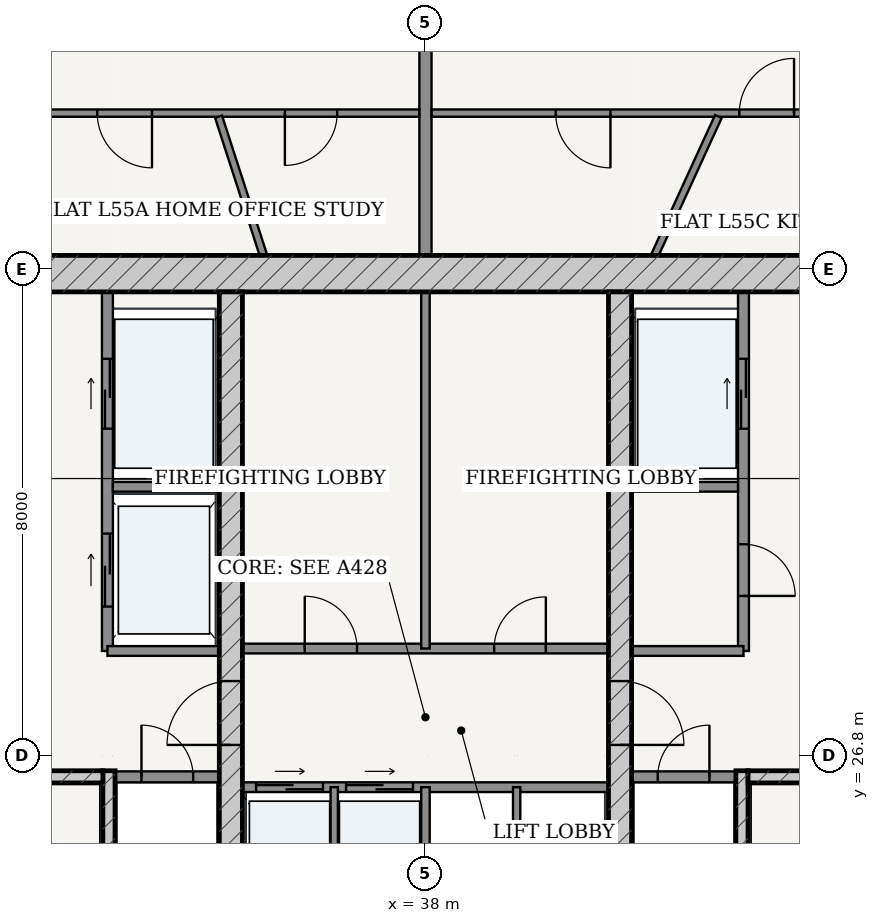
"""IFC4 building model, lengths in metres.
Left out: names, types, materials, properties, quantities, classifications, styles, units other than length and angle.
Written with IfcOpenShell. Run it as: python <this file> out.ifc"""

import sys

from ifc_helpers import new_model, si_unit, direction, frame, frame_2d, origin, place, context, subcontext, project, spatial, rectangle, extrude, source, transform, mapped, element, fill, save


model = new_model("IFC4")
c1 = context("Model", 3, precision=1e-05, world=origin(), true_north=direction((-0.2419218956, 0.970295726276)))
c2 = subcontext(c1, "Body", "Model", "MODEL_VIEW")
j1 = project(units=[si_unit("LENGTHUNIT", "METRE"), si_unit("PLANEANGLEUNIT", "RADIAN")], contexts=[c1])
p1 = place(None, origin())
s1 = spatial("IfcSite", under=j1, at=p1, CompositionType="ELEMENT")
p2 = place(p1, origin())
s2 = spatial("IfcBuilding", under=s1, at=p2, CompositionType="ELEMENT")
p3 = place(p2, frame((0.0, 0.0, 209.7)))
s3 = spatial("IfcBuildingStorey", under=s2, at=p3, CompositionType="ELEMENT", Elevation=209.7)
p4 = place(p3, frame((28.775, 34.725, 0.0), z_axis=(0.0, 0.0, 1.0), x_axis=(1.0, 0.0, 0.0)))
e1 = element("IfcWall", 1, at=p4, inside=s3, PredefinedType="SHEAR", context=c2, shape_type="SweptSolid", body=[
    extrude(rectangle(XDim=18.45, YDim=0.6, at=frame_2d((9.225, 0.0))), origin(), (0.0, 0.0, 1.0), 3.435),
])
p5 = place(p3, frame((32.795, 19.175, 0.0), z_axis=(0.0, 0.0, 1.0), x_axis=(0.0, 1.0, 0.0)))
e2 = element("IfcWall", 2, at=p5, inside=s3, PredefinedType="SOLIDWALL", context=c2, shape_type="SweptSolid", body=[
    extrude(rectangle(XDim=7.375, YDim=0.2, at=frame_2d((3.688, 0.0))), origin(), (0.0, 0.0, 1.0), 3.435),
])
p6 = place(p3, frame((29.375, 26.45, 0.0), z_axis=(0.0, 0.0, 1.0), x_axis=(1.0, 0.0, 0.0)))
e3 = element("IfcWall", 3, at=p6, inside=s3, PredefinedType="SOLIDWALL", context=c2, shape_type="SweptSolid", body=[
    extrude(rectangle(XDim=3.32, YDim=0.2, at=frame_2d((1.66, 0.0))), origin(), (0.0, 0.0, 1.0), 3.435),
])
p7 = place(p6, frame((1.185, 0.0, 0.0)))
e4 = element("IfcOpeningElement", 4, at=p7, cuts=e3, PredefinedType="OPENING", context=c2, shape_type="SweptSolid", body=[
    extrude(rectangle(XDim=0.95, YDim=2.15, at=frame_2d((0.475, 1.075))), frame((0.0, 0.11, 0.0), z_axis=(0.0, -1.0, 0.0), x_axis=(1.0, 0.0, 0.0)), (0.0, 0.0, 1.0), 0.22),
])
p8 = place(p3, frame((43.205, 19.175, 0.0), z_axis=(0.0, 0.0, 1.0), x_axis=(0.0, 1.0, 0.0)))
e5 = element("IfcWall", 5, at=p8, inside=s3, PredefinedType="SOLIDWALL", context=c2, shape_type="SweptSolid", body=[
    extrude(rectangle(XDim=7.375, YDim=0.2, at=frame_2d((3.688, 0.0))), origin(), (0.0, 0.0, 1.0), 3.435),
])
p9 = place(p3, frame((43.305, 26.45, 0.0), z_axis=(0.0, 0.0, 1.0), x_axis=(1.0, 0.0, 0.0)))
e6 = element("IfcWall", 6, at=p9, inside=s3, PredefinedType="SOLIDWALL", context=c2, shape_type="SweptSolid", body=[
    extrude(rectangle(XDim=3.32, YDim=0.2, at=frame_2d((1.66, 0.0))), origin(), (0.0, 0.0, 1.0), 3.435),
])
p10 = place(p9, frame((1.185, 0.0, 0.0)))
e7 = element("IfcOpeningElement", 7, at=p10, cuts=e6, PredefinedType="OPENING", context=c2, shape_type="SweptSolid", body=[
    extrude(rectangle(XDim=0.95, YDim=2.15, at=frame_2d((0.475, 1.075))), frame((0.0, 0.11, 0.0), z_axis=(0.0, -1.0, 0.0), x_axis=(1.0, 0.0, 0.0)), (0.0, 0.0, 1.0), 0.22),
])
p11 = place(p3, frame((34.8, 19.175, 0.0), z_axis=(0.0, 0.0, 1.0), x_axis=(0.0, 1.0, 0.0)))
e8 = element("IfcWall", 8, at=p11, inside=s3, PredefinedType="SHEAR", context=c2, shape_type="SweptSolid", body=[
    extrude(rectangle(XDim=15.25, YDim=0.38, at=frame_2d((7.625, 0.0))), origin(), (0.0, 0.0, 1.0), 3.435),
])
p12 = place(p11, frame((7.8, 0.0, 0.0)))
e9 = element("IfcOpeningElement", 9, at=p12, cuts=e8, PredefinedType="OPENING", context=c2, shape_type="SweptSolid", body=[
    extrude(rectangle(XDim=1.05, YDim=2.15, at=frame_2d((0.525, 1.075))), frame((0.0, 0.2, 0.0), z_axis=(0.0, -1.0, 0.0), x_axis=(1.0, 0.0, 0.0)), (0.0, 0.0, 1.0), 0.4),
])
p13 = place(p3, frame((41.2, 19.175, 0.0), z_axis=(0.0, 0.0, 1.0), x_axis=(0.0, 1.0, 0.0)))
e10 = element("IfcWall", 10, at=p13, inside=s3, PredefinedType="SHEAR", context=c2, shape_type="SweptSolid", body=[
    extrude(rectangle(XDim=15.25, YDim=0.38, at=frame_2d((7.625, 0.0))), origin(), (0.0, 0.0, 1.0), 3.435),
])
p14 = place(p13, frame((7.8, 0.0, 0.0)))
e11 = element("IfcOpeningElement", 11, at=p14, cuts=e10, PredefinedType="OPENING", context=c2, shape_type="SweptSolid", body=[
    extrude(rectangle(XDim=1.05, YDim=2.15, at=frame_2d((0.525, 1.075))), frame((0.0, 0.2, 0.0), z_axis=(0.0, -1.0, 0.0), x_axis=(1.0, 0.0, 0.0)), (0.0, 0.0, 1.0), 0.4),
])
p15 = place(p3, frame((32.9, 26.45, 0.0), z_axis=(0.0, 0.0, 1.0), x_axis=(1.0, 0.0, 0.0)))
e12 = element("IfcWall", 12, at=p15, inside=s3, PredefinedType="PARTITIONING", context=c2, shape_type="SweptSolid", body=[
    extrude(rectangle(XDim=1.71, YDim=0.18, at=frame_2d((0.855, 0.0))), origin(), (0.0, 0.0, 1.0), 3.435),
])
p16 = place(p15, frame((0.43, 0.0, 0.0)))
e13 = element("IfcOpeningElement", 13, at=p16, cuts=e12, PredefinedType="OPENING", context=c2, shape_type="SweptSolid", body=[
    extrude(rectangle(XDim=0.85, YDim=2.1, at=frame_2d((0.425, 1.05))), frame((0.0, 0.1, 0.0), z_axis=(0.0, -1.0, 0.0), x_axis=(1.0, 0.0, 0.0)), (0.0, 0.0, 1.0), 0.2),
])
p17 = place(p3, frame((41.39, 26.45, 0.0), z_axis=(0.0, 0.0, 1.0), x_axis=(1.0, 0.0, 0.0)))
e14 = element("IfcWall", 14, at=p17, inside=s3, PredefinedType="PARTITIONING", context=c2, shape_type="SweptSolid", body=[
    extrude(rectangle(XDim=1.71, YDim=0.18, at=frame_2d((0.855, 0.0))), origin(), (0.0, 0.0, 1.0), 3.435),
])
p18 = place(p17, frame((0.43, 0.0, 0.0)))
e15 = element("IfcOpeningElement", 15, at=p18, cuts=e14, PredefinedType="OPENING", context=c2, shape_type="SweptSolid", body=[
    extrude(rectangle(XDim=0.85, YDim=2.1, at=frame_2d((0.425, 1.05))), frame((0.0, 0.1, 0.0), z_axis=(0.0, -1.0, 0.0), x_axis=(1.0, 0.0, 0.0)), (0.0, 0.0, 1.0), 0.2),
])
p19 = place(p3, frame((32.77, 28.52, 0.0), z_axis=(0.0, 0.0, 1.0), x_axis=(0.0, 1.0, 0.0)))
e16 = element("IfcWall", 16, at=p19, inside=s3, PredefinedType="PARTITIONING", context=c2, shape_type="SweptSolid", body=[
    extrude(rectangle(XDim=5.905, YDim=0.18, at=frame_2d((2.953, 0.0))), origin(), (0.0, 0.0, 1.0), 3.435),
])
p20 = place(p19, frame((3.655, 0.0, 0.0)))
e17 = element("IfcOpeningElement", 17, at=p20, cuts=e16, PredefinedType="OPENING", context=c2, shape_type="SweptSolid", body=[
    extrude(rectangle(XDim=1.15, YDim=2.2, at=frame_2d((0.575, 1.1))), frame((0.0, 0.1, 0.0), z_axis=(0.0, -1.0, 0.0), x_axis=(1.0, 0.0, 0.0)), (0.0, 0.0, 1.0), 0.2),
])
p21 = place(p19, frame((0.73, 0.0, 0.0)))
e18 = element("IfcOpeningElement", 18, at=p21, cuts=e16, PredefinedType="OPENING", context=c2, shape_type="SweptSolid", body=[
    extrude(rectangle(XDim=1.2, YDim=2.25, at=frame_2d((0.6, 1.125))), frame((0.0, 0.1, 0.0), z_axis=(0.0, -1.0, 0.0), x_axis=(1.0, 0.0, 0.0)), (0.0, 0.0, 1.0), 0.2),
])
p22 = place(p3, frame((32.86, 31.22, 0.0), z_axis=(0.0, 0.0, 1.0), x_axis=(1.0, 0.0, 0.0)))
e19 = element("IfcWall", 19, at=p22, inside=s3, PredefinedType="PARTITIONING", context=c2, shape_type="SweptSolid", body=[
    extrude(rectangle(XDim=1.75, YDim=0.16, at=frame_2d((0.875, 0.0))), origin(), (0.0, 0.0, 1.0), 3.435),
])
p23 = place(p3, frame((32.77, 28.52, 0.0), z_axis=(0.0, 0.0, 1.0), x_axis=(1.0, 0.0, 0.0)))
e20 = element("IfcWall", 20, at=p23, inside=s3, PredefinedType="PARTITIONING", context=c2, shape_type="SweptSolid", body=[
    extrude(rectangle(XDim=1.84, YDim=0.16, at=frame_2d((0.92, 0.0))), origin(), (0.0, 0.0, 1.0), 3.435),
])
p24 = place(p3, frame((43.23, 28.52, 0.0), z_axis=(0.0, 0.0, 1.0), x_axis=(0.0, 1.0, 0.0)))
e21 = element("IfcWall", 21, at=p24, inside=s3, PredefinedType="PARTITIONING", context=c2, shape_type="SweptSolid", body=[
    extrude(rectangle(XDim=5.905, YDim=0.18, at=frame_2d((2.953, 0.0))), origin(), (0.0, 0.0, 1.0), 3.435),
])
p25 = place(p24, frame((0.905, 0.0, 0.0)))
e22 = element("IfcOpeningElement", 22, at=p25, cuts=e21, PredefinedType="OPENING", context=c2, shape_type="SweptSolid", body=[
    extrude(rectangle(XDim=0.85, YDim=2.1, at=frame_2d((0.425, 1.05))), frame((0.0, 0.1, 0.0), z_axis=(0.0, -1.0, 0.0), x_axis=(1.0, 0.0, 0.0)), (0.0, 0.0, 1.0), 0.2),
])
p26 = place(p24, frame((3.655, 0.0, 0.0)))
e23 = element("IfcOpeningElement", 23, at=p26, cuts=e21, PredefinedType="OPENING", context=c2, shape_type="SweptSolid", body=[
    extrude(rectangle(XDim=1.15, YDim=2.2, at=frame_2d((0.575, 1.1))), frame((0.0, 0.1, 0.0), z_axis=(0.0, -1.0, 0.0), x_axis=(1.0, 0.0, 0.0)), (0.0, 0.0, 1.0), 0.2),
])
p27 = place(p3, frame((41.39, 31.22, 0.0), z_axis=(0.0, 0.0, 1.0), x_axis=(1.0, 0.0, 0.0)))
e24 = element("IfcWall", 24, at=p27, inside=s3, PredefinedType="PARTITIONING", context=c2, shape_type="SweptSolid", body=[
    extrude(rectangle(XDim=1.75, YDim=0.16, at=frame_2d((0.875, 0.0))), origin(), (0.0, 0.0, 1.0), 3.435),
])
p28 = place(p3, frame((41.39, 28.52, 0.0), z_axis=(0.0, 0.0, 1.0), x_axis=(1.0, 0.0, 0.0)))
e25 = element("IfcWall", 25, at=p28, inside=s3, PredefinedType="PARTITIONING", context=c2, shape_type="SweptSolid", body=[
    extrude(rectangle(XDim=1.84, YDim=0.16, at=frame_2d((0.92, 0.0))), origin(), (0.0, 0.0, 1.0), 3.435),
])
p29 = place(p3, frame((34.99, 28.56, 0.0), z_axis=(0.0, 0.0, 1.0), x_axis=(1.0, 0.0, 0.0)))
e26 = element("IfcWall", 26, at=p29, inside=s3, PredefinedType="PARTITIONING", context=c2, shape_type="SweptSolid", body=[
    extrude(rectangle(XDim=6.02, YDim=0.16, at=frame_2d((3.01, 0.0))), origin(), (0.0, 0.0, 1.0), 3.435),
])
p30 = place(p29, frame((1.025, 0.0, 0.0)))
e27 = element("IfcOpeningElement", 27, at=p30, cuts=e26, PredefinedType="OPENING", context=c2, shape_type="SweptSolid", body=[
    extrude(rectangle(XDim=0.86, YDim=2.1, at=frame_2d((0.43, 1.05))), frame((0.0, 0.09, 0.0), z_axis=(0.0, -1.0, 0.0), x_axis=(1.0, 0.0, 0.0)), (0.0, 0.0, 1.0), 0.18),
])
p31 = place(p29, frame((4.14, 0.0, 0.0)))
e28 = element("IfcOpeningElement", 28, at=p31, cuts=e26, PredefinedType="OPENING", context=c2, shape_type="SweptSolid", body=[
    extrude(rectangle(XDim=0.85, YDim=2.1, at=frame_2d((0.425, 1.05))), frame((0.0, 0.09, 0.0), z_axis=(0.0, -1.0, 0.0), x_axis=(1.0, 0.0, 0.0)), (0.0, 0.0, 1.0), 0.18),
])
p32 = place(p3, frame((38.0, 28.56, 0.0), z_axis=(0.0, 0.0, 1.0), x_axis=(0.0, 1.0, 0.0)))
e29 = element("IfcWall", 29, at=p32, inside=s3, PredefinedType="PARTITIONING", context=c2, shape_type="SweptSolid", body=[
    extrude(rectangle(XDim=5.865, YDim=0.14, at=frame_2d((2.933, 0.0))), origin(), (0.0, 0.0, 1.0), 3.435),
])
p33 = place(p3, frame((34.99, 26.28, 0.0), z_axis=(0.0, 0.0, 1.0), x_axis=(1.0, 0.0, 0.0)))
e30 = element("IfcWall", 30, at=p33, inside=s3, PredefinedType="PARTITIONING", context=c2, shape_type="SweptSolid", body=[
    extrude(rectangle(XDim=6.02, YDim=0.16, at=frame_2d((3.01, 0.0))), origin(), (0.0, 0.0, 1.0), 3.435),
])
p34 = place(p33, frame((0.225, 0.0, 0.0)))
e31 = element("IfcOpeningElement", 31, at=p34, cuts=e30, PredefinedType="OPENING", context=c2, shape_type="SweptSolid", body=[
    extrude(rectangle(XDim=1.1, YDim=2.2, at=frame_2d((0.55, 1.1))), frame((0.0, 0.09, 0.0), z_axis=(0.0, -1.0, 0.0), x_axis=(1.0, 0.0, 0.0)), (0.0, 0.0, 1.0), 0.18),
])
p35 = place(p33, frame((1.705, 0.0, 0.0)))
e32 = element("IfcOpeningElement", 32, at=p35, cuts=e30, PredefinedType="OPENING", context=c2, shape_type="SweptSolid", body=[
    extrude(rectangle(XDim=1.1, YDim=2.2, at=frame_2d((0.55, 1.1))), frame((0.0, 0.09, 0.0), z_axis=(0.0, -1.0, 0.0), x_axis=(1.0, 0.0, 0.0)), (0.0, 0.0, 1.0), 0.18),
])
p36 = place(p3, frame((36.5, 23.72, 0.0), z_axis=(0.0, 0.0, 1.0), x_axis=(0.0, 1.0, 0.0)))
e33 = element("IfcWall", 33, at=p36, inside=s3, PredefinedType="PARTITIONING", context=c2, shape_type="SweptSolid", body=[
    extrude(rectangle(XDim=2.56, YDim=0.12, at=frame_2d((1.28, 0.0))), origin(), (0.0, 0.0, 1.0), 3.435),
])
p37 = place(p3, frame((38.0, 23.72, 0.0), z_axis=(0.0, 0.0, 1.0), x_axis=(0.0, 1.0, 0.0)))
e34 = element("IfcWall", 34, at=p37, inside=s3, PredefinedType="PARTITIONING", context=c2, shape_type="SweptSolid", body=[
    extrude(rectangle(XDim=2.56, YDim=0.14, at=frame_2d((1.28, 0.0))), origin(), (0.0, 0.0, 1.0), 3.435),
])
p38 = place(p3, frame((39.5, 23.72, 0.0), z_axis=(0.0, 0.0, 1.0), x_axis=(0.0, 1.0, 0.0)))
e35 = element("IfcWall", 35, at=p38, inside=s3, PredefinedType="PARTITIONING", context=c2, shape_type="SweptSolid", body=[
    extrude(rectangle(XDim=2.56, YDim=0.12, at=frame_2d((1.28, 0.0))), origin(), (0.0, 0.0, 1.0), 3.435),
])
p39 = place(p3, frame((38.0, 35.027, 0.0), z_axis=(0.0, 0.0, 1.0), x_axis=(0.0, 1.0, 0.0)))
e36 = element("IfcWall", 36, at=p39, inside=s3, PredefinedType="PARTITIONING", context=c2, shape_type="SweptSolid", body=[
    extrude(rectangle(XDim=11.413, YDim=0.2, at=frame_2d((5.707, 0.0))), origin(), (0.0, 0.0, 1.0), 2.52),
])
p40 = place(p3, frame((31.275, 37.365, 0.0), z_axis=(0.0, 0.0, 1.0), x_axis=(1.0, 0.0, 0.0)))
e37 = element("IfcWall", 37, at=p40, inside=s3, PredefinedType="PARTITIONING", context=c2, shape_type="SweptSolid", body=[
    extrude(rectangle(XDim=6.623, YDim=0.12, at=frame_2d((3.312, 0.0))), origin(), (0.0, 0.0, 1.0), 2.951),
])
p41 = place(p40, frame((4.413, 0.0, 0.0)))
e38 = element("IfcOpeningElement", 38, at=p41, cuts=e37, PredefinedType="OPENING", context=c2, shape_type="SweptSolid", body=[
    extrude(rectangle(XDim=0.86, YDim=2.15, at=frame_2d((0.43, 1.075))), frame((0.0, 0.07, 0.0), z_axis=(0.0, -1.0, 0.0), x_axis=(1.0, 0.0, 0.0)), (0.0, 0.0, 1.0), 0.14),
])
p42 = place(p40, frame((1.328, 0.0, 0.0)))
e39 = element("IfcOpeningElement", 39, at=p42, cuts=e37, PredefinedType="OPENING", context=c2, shape_type="SweptSolid", body=[
    extrude(rectangle(XDim=0.9, YDim=2.15, at=frame_2d((0.45, 1.075))), frame((0.0, 0.07, 0.0), z_axis=(0.0, -1.0, 0.0), x_axis=(1.0, 0.0, 0.0)), (0.0, 0.0, 1.0), 0.14),
])
p43 = place(p3, frame((35.336, 35.027, 0.0), z_axis=(0.0, 0.0, 1.0), x_axis=(-0.308083476138, 0.951359328398, 0.0)))
e40 = element("IfcWall", 40, at=p43, inside=s3, PredefinedType="PARTITIONING", context=c2, shape_type="SweptSolid", body=[
    extrude(rectangle(XDim=2.396, YDim=0.12, at=frame_2d((1.198, 0.0))), origin(), (0.0, 0.0, 1.0), 2.52),
])
p44 = place(p3, frame((38.102, 37.365, 0.0), z_axis=(0.0, 0.0, 1.0), x_axis=(1.0, 0.0, 0.0)))
e41 = element("IfcWall", 41, at=p44, inside=s3, PredefinedType="PARTITIONING", context=c2, shape_type="SweptSolid", body=[
    extrude(rectangle(XDim=6.623, YDim=0.12, at=frame_2d((3.312, 0.0))), origin(), (0.0, 0.0, 1.0), 2.951),
])
p45 = place(p44, frame((5.06, 0.0, 0.0)))
e42 = element("IfcOpeningElement", 42, at=p45, cuts=e41, PredefinedType="OPENING", context=c2, shape_type="SweptSolid", body=[
    extrude(rectangle(XDim=0.9, YDim=2.15, at=frame_2d((0.45, 1.075))), frame((0.0, 0.07, 0.0), z_axis=(0.0, -1.0, 0.0), x_axis=(1.0, 0.0, 0.0)), (0.0, 0.0, 1.0), 0.14),
])
p46 = place(p44, frame((2.04, 0.0, 0.0)))
e43 = element("IfcOpeningElement", 43, at=p46, cuts=e41, PredefinedType="OPENING", context=c2, shape_type="SweptSolid", body=[
    extrude(rectangle(XDim=0.9, YDim=2.15, at=frame_2d((0.45, 1.075))), frame((0.0, 0.07, 0.0), z_axis=(0.0, -1.0, 0.0), x_axis=(1.0, 0.0, 0.0)), (0.0, 0.0, 1.0), 0.14),
])
p47 = place(p3, frame((41.771, 35.027, 0.0), z_axis=(0.0, 0.0, 1.0), x_axis=(0.416688202143, 0.909049471808, 0.0)))
e44 = element("IfcWall", 44, at=p47, inside=s3, PredefinedType="PARTITIONING", context=c2, shape_type="SweptSolid", body=[
    extrude(rectangle(XDim=2.51, YDim=0.12, at=frame_2d((1.255, 0.0))), origin(), (0.0, 0.0, 1.0), 3.435),
])
m1 = source(origin(), c2, "Body", "SweptSolid", [
    extrude(rectangle(XDim=1.05, YDim=2.15, at=frame_2d((0.525, 1.075))), frame((0.0, 0.025, 0.0), z_axis=(0.0, -1.0, 0.0), x_axis=(1.0, 0.0, 0.0)), (0.0, 0.0, 1.0), 0.05),
])
p48 = place(p12, origin())
e45 = element("IfcDoor", 45, at=p48, inside=s3, OperationType="SINGLE_SWING_LEFT", PredefinedType="DOOR", context=c2, shape_type="MappedRepresentation", body=[
    mapped(m1, transform((0.0, 0.0, 0.0), scale=1.0)),
])
fill(e9, e45)
p49 = place(p14, frame((1.05, 0.0, 0.0), z_axis=(0.0, 0.0, 1.0), x_axis=(-1.0, 0.0, 0.0)))
e46 = element("IfcDoor", 46, at=p49, inside=s3, OperationType="SINGLE_SWING_RIGHT", PredefinedType="DOOR", context=c2, shape_type="MappedRepresentation", body=[
    mapped(m1, transform((0.0, 0.0, 0.0), scale=1.0)),
])
fill(e11, e46)
m2 = source(origin(), c2, "Body", "SweptSolid", [
    extrude(rectangle(XDim=0.85, YDim=2.1, at=frame_2d((0.425, 1.05))), frame((0.0, 0.025, 0.0), z_axis=(0.0, -1.0, 0.0), x_axis=(1.0, 0.0, 0.0)), (0.0, 0.0, 1.0), 0.05),
])
p50 = place(p16, origin())
e47 = element("IfcDoor", 47, at=p50, inside=s3, OperationType="SINGLE_SWING_LEFT", PredefinedType="DOOR", context=c2, shape_type="MappedRepresentation", body=[
    mapped(m2, transform((0.0, 0.0, 0.0), scale=1.0)),
])
fill(e13, e47)
p51 = place(p18, origin())
e48 = element("IfcDoor", 48, at=p51, inside=s3, OperationType="SINGLE_SWING_RIGHT", PredefinedType="DOOR", context=c2, shape_type="MappedRepresentation", body=[
    mapped(m2, transform((0.0, 0.0, 0.0), scale=1.0)),
])
fill(e15, e48)
p52 = place(p25, frame((0.85, 0.0, 0.0), z_axis=(0.0, 0.0, 1.0), x_axis=(-1.0, 0.0, 0.0)))
e49 = element("IfcDoor", 49, at=p52, inside=s3, OperationType="SINGLE_SWING_RIGHT", PredefinedType="DOOR", context=c2, shape_type="MappedRepresentation", body=[
    mapped(m2, transform((0.0, 0.0, 0.0), scale=1.0)),
])
fill(e22, e49)
m3 = source(origin(), c2, "Body", "SweptSolid", [
    extrude(rectangle(XDim=0.86, YDim=2.1, at=frame_2d((0.43, 1.05))), frame((0.0, 0.025, 0.0), z_axis=(0.0, -1.0, 0.0), x_axis=(1.0, 0.0, 0.0)), (0.0, 0.0, 1.0), 0.05),
])
p53 = place(p30, origin())
e50 = element("IfcDoor", 50, at=p53, inside=s3, OperationType="SINGLE_SWING_LEFT", PredefinedType="DOOR", context=c2, shape_type="MappedRepresentation", body=[
    mapped(m3, transform((0.0, 0.0, 0.0), scale=1.0)),
])
fill(e27, e50)
p54 = place(p31, origin())
e51 = element("IfcDoor", 51, at=p54, inside=s3, OperationType="SINGLE_SWING_RIGHT", PredefinedType="DOOR", context=c2, shape_type="MappedRepresentation", body=[
    mapped(m2, transform((0.0, 0.0, 0.0), scale=1.0)),
])
fill(e28, e51)
m4 = source(origin(), c2, "Body", "SweptSolid", [
    extrude(rectangle(XDim=1.15, YDim=2.2, at=frame_2d((0.575, 1.1))), frame((0.0, 0.025, 0.0), z_axis=(0.0, -1.0, 0.0), x_axis=(1.0, 0.0, 0.0)), (0.0, 0.0, 1.0), 0.05),
])
p55 = place(p20, origin())
e52 = element("IfcDoor", 52, at=p55, inside=s3, OperationType="DOUBLE_DOOR_SLIDING", PredefinedType="DOOR", context=c2, shape_type="MappedRepresentation", body=[
    mapped(m4, transform((0.0, 0.0, 0.0), scale=1.0)),
])
fill(e17, e52)
p56 = place(p26, origin())
e53 = element("IfcDoor", 53, at=p56, inside=s3, OperationType="DOUBLE_DOOR_SLIDING", PredefinedType="DOOR", context=c2, shape_type="MappedRepresentation", body=[
    mapped(m4, transform((0.0, 0.0, 0.0), scale=1.0)),
])
fill(e23, e53)
m5 = source(origin(), c2, "Body", "SweptSolid", [
    extrude(rectangle(XDim=1.2, YDim=2.25, at=frame_2d((0.6, 1.125))), frame((0.0, 0.025, 0.0), z_axis=(0.0, -1.0, 0.0), x_axis=(1.0, 0.0, 0.0)), (0.0, 0.0, 1.0), 0.05),
])
p57 = place(p21, origin())
e54 = element("IfcDoor", 54, at=p57, inside=s3, OperationType="DOUBLE_DOOR_SLIDING", PredefinedType="DOOR", context=c2, shape_type="MappedRepresentation", body=[
    mapped(m5, transform((0.0, 0.0, 0.0), scale=1.0)),
])
fill(e18, e54)
m6 = source(origin(), c2, "Body", "SweptSolid", [
    extrude(rectangle(XDim=1.1, YDim=2.2, at=frame_2d((0.55, 1.1))), frame((0.0, 0.025, 0.0), z_axis=(0.0, -1.0, 0.0), x_axis=(1.0, 0.0, 0.0)), (0.0, 0.0, 1.0), 0.05),
])
p58 = place(p34, origin())
e55 = element("IfcDoor", 55, at=p58, inside=s3, OperationType="DOUBLE_DOOR_SLIDING", PredefinedType="DOOR", context=c2, shape_type="MappedRepresentation", body=[
    mapped(m6, transform((0.0, 0.0, 0.0), scale=1.0)),
])
fill(e31, e55)
p59 = place(p35, origin())
e56 = element("IfcDoor", 56, at=p59, inside=s3, OperationType="DOUBLE_DOOR_SLIDING", PredefinedType="DOOR", context=c2, shape_type="MappedRepresentation", body=[
    mapped(m6, transform((0.0, 0.0, 0.0), scale=1.0)),
])
fill(e32, e56)
m7 = source(origin(), c2, "Body", "SweptSolid", [
    extrude(rectangle(XDim=0.86, YDim=2.15, at=frame_2d((0.43, 1.075))), frame((0.0, 0.025, 0.0), z_axis=(0.0, -1.0, 0.0), x_axis=(1.0, 0.0, 0.0)), (0.0, 0.0, 1.0), 0.05),
])
p60 = place(p41, frame((0.86, 0.0, 0.0), z_axis=(0.0, 0.0, 1.0), x_axis=(-1.0, 0.0, 0.0)))
e57 = element("IfcDoor", 57, at=p60, inside=s3, OperationType="SINGLE_SWING_RIGHT", PredefinedType="DOOR", context=c2, shape_type="MappedRepresentation", body=[
    mapped(m7, transform((0.0, 0.0, 0.0), scale=1.0)),
])
fill(e38, e57)
m8 = source(origin(), c2, "Body", "SweptSolid", [
    extrude(rectangle(XDim=0.9, YDim=2.15, at=frame_2d((0.45, 1.075))), frame((0.0, 0.025, 0.0), z_axis=(0.0, -1.0, 0.0), x_axis=(1.0, 0.0, 0.0)), (0.0, 0.0, 1.0), 0.05),
])
p61 = place(p42, frame((0.9, 0.0, 0.0), z_axis=(0.0, 0.0, 1.0), x_axis=(-1.0, 0.0, 0.0)))
e58 = element("IfcDoor", 58, at=p61, inside=s3, OperationType="SINGLE_SWING_LEFT", PredefinedType="DOOR", context=c2, shape_type="MappedRepresentation", body=[
    mapped(m8, transform((0.0, 0.0, 0.0), scale=1.0)),
])
fill(e39, e58)
p62 = place(p45, origin())
e59 = element("IfcDoor", 59, at=p62, inside=s3, OperationType="SINGLE_SWING_RIGHT", PredefinedType="DOOR", context=c2, shape_type="MappedRepresentation", body=[
    mapped(m8, transform((0.0, 0.0, 0.0), scale=1.0)),
])
fill(e42, e59)
p63 = place(p46, frame((0.9, 0.0, 0.0), z_axis=(0.0, 0.0, 1.0), x_axis=(-1.0, 0.0, 0.0)))
e60 = element("IfcDoor", 60, at=p63, inside=s3, OperationType="SINGLE_SWING_LEFT", PredefinedType="DOOR", context=c2, shape_type="MappedRepresentation", body=[
    mapped(m8, transform((0.0, 0.0, 0.0), scale=1.0)),
])
fill(e43, e60)
save(model, sys.argv[1])
